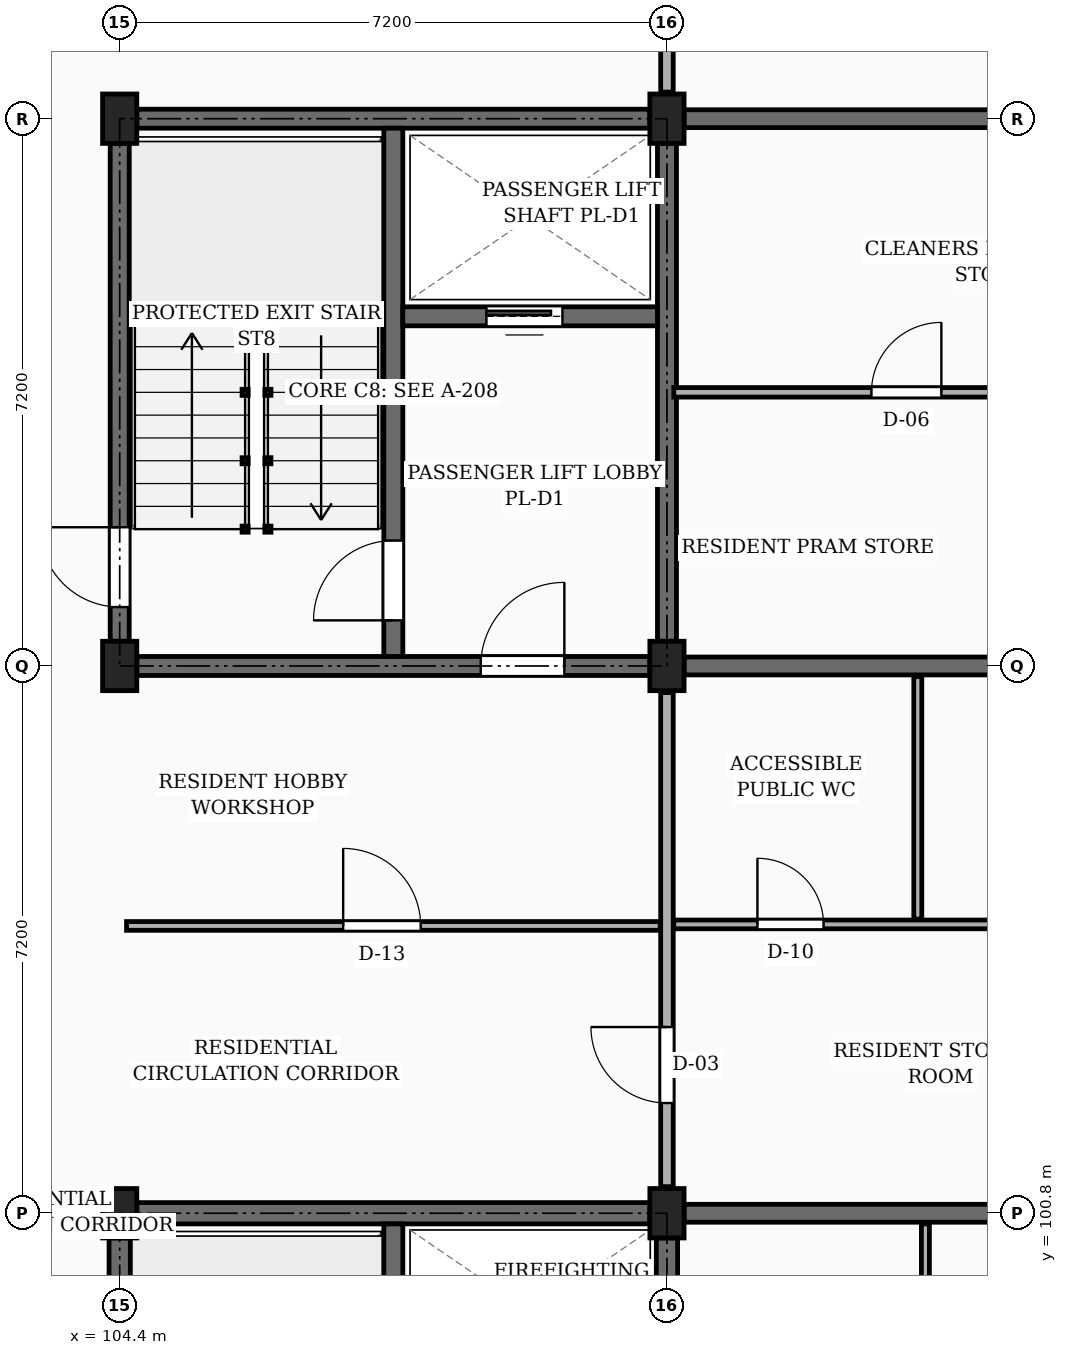
"""IFC4 building model, lengths in metres.
Left out: names, types, materials, properties, quantities, classifications, styles, units other than length and angle.
Written with IfcOpenShell. Run it as: python <this file> out.ifc"""

import sys

from ifc_helpers import new_model, si_unit, direction, frame, frame_2d, origin, origin_2d, place, context, subcontext, project, spatial, rectangle, extrude, element, fill, save


model = new_model("IFC4")
c1 = context("Model", 3, precision=1e-05, world=origin(), true_north=direction((0.0, 1.0)))
c2 = subcontext(c1, "Body", "Model", "MODEL_VIEW")
j1 = project(units=[si_unit("LENGTHUNIT", "METRE"), si_unit("PLANEANGLEUNIT", "RADIAN")], contexts=[c1])
p1 = place(None, origin())
s1 = spatial("IfcSite", under=j1, at=p1, CompositionType="ELEMENT")
p2 = place(p1, origin())
s2 = spatial("IfcBuilding", under=s1, at=p2, CompositionType="ELEMENT")
p3 = place(p2, frame((0.0, 0.0, 13.95)))
s3 = spatial("IfcBuildingStorey", under=s2, at=p3, CompositionType="ELEMENT", Elevation=13.95)
for number, where, z_axis, x_axis in (
    (1, (104.4, 100.8, 0.0), (0.0, 0.0, 1.0), (1.0, 0.0, 0.0)),
    (2, (104.4, 108.0, 0.0), (0.0, 0.0, 1.0), (1.0, 0.0, 0.0)),
    (3, (104.4, 115.2, 0.0), (0.0, 0.0, 1.0), (1.0, 0.0, 0.0)),
    (4, (111.6, 100.8, 0.0), (0.0, 0.0, 1.0), (1.0, 0.0, 0.0)),
    (5, (111.6, 108.0, 0.0), (0.0, 0.0, 1.0), (1.0, 0.0, 0.0)),
    (6, (111.6, 115.2, 0.0), (0.0, 0.0, 1.0), (1.0, 0.0, 0.0)),
):
    element("IfcColumn", number, at=place(p3, frame(where, z_axis=z_axis, x_axis=x_axis)), inside=s3, PredefinedType="COLUMN", context=c2, shape_type="SweptSolid", body=[
        extrude(rectangle(XDim=0.45, YDim=0.65, at=origin_2d()), origin(), (0.0, 0.0, 1.0), 3.15),
    ])
p4 = place(p3, frame((111.825, 100.8, 0.0), z_axis=(0.0, 0.0, 1.0), x_axis=(1.0, 0.0, 0.0)))
e7 = element("IfcWall", 7, at=p4, inside=s3, PredefinedType="SOLIDWALL", context=c2, shape_type="SweptSolid", body=[
    extrude(rectangle(XDim=6.7, YDim=0.235, at=frame_2d((3.35, 0.0))), origin(), (0.0, 0.0, 1.0), 2.19),
])
p5 = place(p3, frame((111.825, 108.0, 0.0), z_axis=(0.0, 0.0, 1.0), x_axis=(1.0, 0.0, 0.0)))
e8 = element("IfcWall", 8, at=p5, inside=s3, PredefinedType="SOLIDWALL", context=c2, shape_type="SweptSolid", body=[
    extrude(rectangle(XDim=6.7, YDim=0.235, at=frame_2d((3.35, 0.0))), origin(), (0.0, 0.0, 1.0), 2.19),
])
p6 = place(p5, frame((4.35, 0.0, 0.0)))
e9 = element("IfcOpeningElement", 9, at=p6, cuts=e8, PredefinedType="OPENING", context=c2, shape_type="SweptSolid", body=[
    extrude(rectangle(XDim=0.98, YDim=2.12, at=frame_2d((0.49, 1.06))), frame((0.0, 0.127, 0.0), z_axis=(0.0, -1.0, 0.0), x_axis=(1.0, 0.0, 0.0)), (0.0, 0.0, 1.0), 0.255),
])
p7 = place(p3, frame((111.825, 115.2, 0.0), z_axis=(0.0, 0.0, 1.0), x_axis=(1.0, 0.0, 0.0)))
e10 = element("IfcWall", 10, at=p7, inside=s3, PredefinedType="SOLIDWALL", context=c2, shape_type="SweptSolid", body=[
    extrude(rectangle(XDim=6.7, YDim=0.235, at=frame_2d((3.35, 0.0))), origin(), (0.0, 0.0, 1.0), 2.19),
])
p8 = place(p3, frame((104.4, 93.925, 0.0), z_axis=(0.0, 0.0, 1.0), x_axis=(0.0, 1.0, 0.0)))
e11 = element("IfcWall", 11, at=p8, inside=s3, PredefinedType="SHEAR", context=c2, shape_type="SweptSolid", body=[
    extrude(rectangle(XDim=6.55, YDim=0.28, at=frame_2d((3.275, 0.0))), origin(), (0.0, 0.0, 1.0), 2.89),
])
p9 = place(p8, frame((0.45, 0.0, 0.0)))
e12 = element("IfcOpeningElement", 12, at=p9, cuts=e11, PredefinedType="OPENING", context=c2, shape_type="SweptSolid", body=[
    extrude(rectangle(XDim=1.05, YDim=2.15, at=frame_2d((0.525, 1.075))), frame((0.0, 0.15, 0.0), z_axis=(0.0, -1.0, 0.0), x_axis=(1.0, 0.0, 0.0)), (0.0, 0.0, 1.0), 0.3),
])
p10 = place(p3, frame((104.625, 100.8, 0.0), z_axis=(0.0, 0.0, 1.0), x_axis=(1.0, 0.0, 0.0)))
e13 = element("IfcWall", 13, at=p10, inside=s3, PredefinedType="SHEAR", context=c2, shape_type="SweptSolid", body=[
    extrude(rectangle(XDim=6.75, YDim=0.28, at=frame_2d((3.375, 0.0))), origin(), (0.0, 0.0, 1.0), 2.89),
])
p11 = place(p3, frame((111.6, 93.925, 0.0), z_axis=(0.0, 0.0, 1.0), x_axis=(0.0, 1.0, 0.0)))
e14 = element("IfcWall", 14, at=p11, inside=s3, PredefinedType="SHEAR", context=c2, shape_type="SweptSolid", body=[
    extrude(rectangle(XDim=6.55, YDim=0.28, at=frame_2d((3.275, 0.0))), origin(), (0.0, 0.0, 1.0), 2.89),
])
p12 = place(p3, frame((108.0, 93.74, 0.0), z_axis=(0.0, 0.0, 1.0), x_axis=(0.0, 1.0, 0.0)))
e15 = element("IfcWall", 15, at=p12, inside=s3, PredefinedType="SHEAR", context=c2, shape_type="SweptSolid", body=[
    extrude(rectangle(XDim=6.92, YDim=0.25, at=frame_2d((3.46, 0.0))), origin(), (0.0, 0.0, 1.0), 2.89),
])
p13 = place(p12, frame((0.46, 0.0, 0.0)))
e16 = element("IfcOpeningElement", 16, at=p13, cuts=e15, PredefinedType="OPENING", context=c2, shape_type="SweptSolid", body=[
    extrude(rectangle(XDim=1.05, YDim=2.15, at=frame_2d((0.525, 1.075))), frame((0.0, 0.135, 0.0), z_axis=(0.0, -1.0, 0.0), x_axis=(1.0, 0.0, 0.0)), (0.0, 0.0, 1.0), 0.27),
])
p14 = place(p3, frame((104.4, 108.325, 0.0), z_axis=(0.0, 0.0, 1.0), x_axis=(0.0, 1.0, 0.0)))
e17 = element("IfcWall", 17, at=p14, inside=s3, PredefinedType="SHEAR", context=c2, shape_type="SweptSolid", body=[
    extrude(rectangle(XDim=6.55, YDim=0.25, at=frame_2d((3.275, 0.0))), origin(), (0.0, 0.0, 1.0), 2.89),
])
p15 = place(p14, frame((0.45, 0.0, 0.0)))
e18 = element("IfcOpeningElement", 18, at=p15, cuts=e17, PredefinedType="OPENING", context=c2, shape_type="SweptSolid", body=[
    extrude(rectangle(XDim=1.05, YDim=2.15, at=frame_2d((0.525, 1.075))), frame((0.0, 0.135, 0.0), z_axis=(0.0, -1.0, 0.0), x_axis=(1.0, 0.0, 0.0)), (0.0, 0.0, 1.0), 0.27),
])
p16 = place(p3, frame((104.625, 115.2, 0.0), z_axis=(0.0, 0.0, 1.0), x_axis=(1.0, 0.0, 0.0)))
e19 = element("IfcWall", 19, at=p16, inside=s3, PredefinedType="SHEAR", context=c2, shape_type="SweptSolid", body=[
    extrude(rectangle(XDim=6.75, YDim=0.25, at=frame_2d((3.375, 0.0))), origin(), (0.0, 0.0, 1.0), 2.89),
])
p17 = place(p3, frame((111.6, 108.325, 0.0), z_axis=(0.0, 0.0, 1.0), x_axis=(0.0, 1.0, 0.0)))
e20 = element("IfcWall", 20, at=p17, inside=s3, PredefinedType="SHEAR", context=c2, shape_type="SweptSolid", body=[
    extrude(rectangle(XDim=6.55, YDim=0.25, at=frame_2d((3.275, 0.0))), origin(), (0.0, 0.0, 1.0), 2.89),
])
p18 = place(p3, frame((104.625, 108.0, 0.0), z_axis=(0.0, 0.0, 1.0), x_axis=(1.0, 0.0, 0.0)))
e21 = element("IfcWall", 21, at=p18, inside=s3, PredefinedType="SHEAR", context=c2, shape_type="SweptSolid", body=[
    extrude(rectangle(XDim=6.75, YDim=0.25, at=frame_2d((3.375, 0.0))), origin(), (0.0, 0.0, 1.0), 2.89),
])
p19 = place(p18, frame((4.525, 0.0, 0.0)))
e22 = element("IfcOpeningElement", 22, at=p19, cuts=e21, PredefinedType="OPENING", context=c2, shape_type="SweptSolid", body=[
    extrude(rectangle(XDim=1.1, YDim=2.15, at=frame_2d((0.55, 1.075))), frame((0.0, 0.135, 0.0), z_axis=(0.0, -1.0, 0.0), x_axis=(1.0, 0.0, 0.0)), (0.0, 0.0, 1.0), 0.27),
])
p20 = place(p3, frame((108.0, 108.125, 0.0), z_axis=(0.0, 0.0, 1.0), x_axis=(0.0, 1.0, 0.0)))
e23 = element("IfcWall", 23, at=p20, inside=s3, PredefinedType="SHEAR", context=c2, shape_type="SweptSolid", body=[
    extrude(rectangle(XDim=6.95, YDim=0.25, at=frame_2d((3.475, 0.0))), origin(), (0.0, 0.0, 1.0), 2.89),
])
p21 = place(p20, frame((0.475, 0.0, 0.0)))
e24 = element("IfcOpeningElement", 24, at=p21, cuts=e23, PredefinedType="OPENING", context=c2, shape_type="SweptSolid", body=[
    extrude(rectangle(XDim=1.05, YDim=2.15, at=frame_2d((0.525, 1.075))), frame((0.0, 0.135, 0.0), z_axis=(0.0, -1.0, 0.0), x_axis=(1.0, 0.0, 0.0)), (0.0, 0.0, 1.0), 0.27),
])
p22 = place(p3, frame((108.125, 112.6, 0.0), z_axis=(0.0, 0.0, 1.0), x_axis=(1.0, 0.0, 0.0)))
e25 = element("IfcWall", 25, at=p22, inside=s3, PredefinedType="SHEAR", context=c2, shape_type="SweptSolid", body=[
    extrude(rectangle(XDim=3.35, YDim=0.25, at=frame_2d((1.675, 0.0))), origin(), (0.0, 0.0, 1.0), 2.89),
])
p23 = place(p22, frame((1.1, 0.0, 0.0)))
e26 = element("IfcOpeningElement", 26, at=p23, cuts=e25, PredefinedType="OPENING", context=c2, shape_type="SweptSolid", body=[
    extrude(rectangle(XDim=1.0, YDim=2.2, at=frame_2d((0.5, 1.1))), frame((0.0, 0.135, 0.0), z_axis=(0.0, -1.0, 0.0), x_axis=(1.0, 0.0, 0.0)), (0.0, 0.0, 1.0), 0.27),
])
p24 = place(p3, frame((111.6, 101.15, 0.0), z_axis=(0.0, 0.0, 1.0), x_axis=(0.0, 1.0, 0.0)))
e27 = element("IfcWall", 27, at=p24, inside=s3, PredefinedType="PARTITIONING", context=c2, shape_type="SweptSolid", body=[
    extrude(rectangle(XDim=6.5, YDim=0.165, at=frame_2d((3.25, 0.0))), origin(), (0.0, 0.0, 1.0), 2.325),
])
p25 = place(p24, frame((1.1, 0.0, 0.0)))
e28 = element("IfcOpeningElement", 28, at=p25, cuts=e27, PredefinedType="OPENING", context=c2, shape_type="SweptSolid", body=[
    extrude(rectangle(XDim=1.0, YDim=2.15, at=frame_2d((0.5, 1.075))), frame((0.0, 0.093, 0.0), z_axis=(0.0, -1.0, 0.0), x_axis=(1.0, 0.0, 0.0)), (0.0, 0.0, 1.0), 0.185),
])
p26 = place(p3, frame((111.6, 115.55, 0.0), z_axis=(0.0, 0.0, 1.0), x_axis=(0.0, 1.0, 0.0)))
e29 = element("IfcWall", 29, at=p26, inside=s3, PredefinedType="PARTITIONING", context=c2, shape_type="SweptSolid", body=[
    extrude(rectangle(XDim=6.5, YDim=0.165, at=frame_2d((3.25, 0.0))), origin(), (0.0, 0.0, 1.0), 2.325),
])
p27 = place(p26, frame((1.1, 0.0, 0.0)))
e30 = element("IfcOpeningElement", 30, at=p27, cuts=e29, PredefinedType="OPENING", context=c2, shape_type="SweptSolid", body=[
    extrude(rectangle(XDim=0.94, YDim=2.12, at=frame_2d((0.47, 1.06))), frame((0.0, 0.093, 0.0), z_axis=(0.0, -1.0, 0.0), x_axis=(1.0, 0.0, 0.0)), (0.0, 0.0, 1.0), 0.185),
])
p28 = place(p3, frame((115.0, 96.97, 0.0), z_axis=(0.0, 0.0, 1.0), x_axis=(0.0, 1.0, 0.0)))
e31 = element("IfcWall", 31, at=p28, inside=s3, PredefinedType="PARTITIONING", context=c2, shape_type="SweptSolid", body=[
    extrude(rectangle(XDim=3.69, YDim=0.105, at=frame_2d((1.845, 0.0))), origin(), (0.0, 0.0, 1.0), 2.325),
])
p29 = place(p3, frame((104.49, 104.58, 0.0), z_axis=(0.0, 0.0, 1.0), x_axis=(1.0, 0.0, 0.0)))
e32 = element("IfcWall", 32, at=p29, inside=s3, PredefinedType="PARTITIONING", context=c2, shape_type="SweptSolid", body=[
    extrude(rectangle(XDim=7.02, YDim=0.115, at=frame_2d((3.51, 0.0))), origin(), (0.0, 0.0, 1.0), 2.325),
])
p30 = place(p29, frame((2.85, 0.0, 0.0)))
e33 = element("IfcOpeningElement", 33, at=p30, cuts=e32, PredefinedType="OPENING", context=c2, shape_type="SweptSolid", body=[
    extrude(rectangle(XDim=1.02, YDim=2.15, at=frame_2d((0.51, 1.075))), frame((0.0, 0.067, 0.0), z_axis=(0.0, -1.0, 0.0), x_axis=(1.0, 0.0, 0.0)), (0.0, 0.0, 1.0), 0.135),
])
p31 = place(p3, frame((111.69, 104.6, 0.0), z_axis=(0.0, 0.0, 1.0), x_axis=(1.0, 0.0, 0.0)))
e34 = element("IfcWall", 34, at=p31, inside=s3, PredefinedType="PARTITIONING", context=c2, shape_type="SweptSolid", body=[
    extrude(rectangle(XDim=6.935, YDim=0.115, at=frame_2d((3.468, 0.0))), origin(), (0.0, 0.0, 1.0), 2.325),
])
p32 = place(p31, frame((1.1, 0.0, 0.0)))
e35 = element("IfcOpeningElement", 35, at=p32, cuts=e34, PredefinedType="OPENING", context=c2, shape_type="SweptSolid", body=[
    extrude(rectangle(XDim=0.87, YDim=2.05, at=frame_2d((0.435, 1.025))), frame((0.0, 0.067, 0.0), z_axis=(0.0, -1.0, 0.0), x_axis=(1.0, 0.0, 0.0)), (0.0, 0.0, 1.0), 0.135),
])
p33 = place(p31, frame((4.5, 0.0, 0.0)))
e36 = element("IfcOpeningElement", 36, at=p33, cuts=e34, PredefinedType="OPENING", context=c2, shape_type="SweptSolid", body=[
    extrude(rectangle(XDim=0.92, YDim=2.1, at=frame_2d((0.46, 1.05))), frame((0.0, 0.067, 0.0), z_axis=(0.0, -1.0, 0.0), x_axis=(1.0, 0.0, 0.0)), (0.0, 0.0, 1.0), 0.135),
])
p34 = place(p3, frame((114.9, 104.67, 0.0), z_axis=(0.0, 0.0, 1.0), x_axis=(0.0, 1.0, 0.0)))
e37 = element("IfcWall", 37, at=p34, inside=s3, PredefinedType="PARTITIONING", context=c2, shape_type="SweptSolid", body=[
    extrude(rectangle(XDim=3.19, YDim=0.105, at=frame_2d((1.595, 0.0))), origin(), (0.0, 0.0, 1.0), 2.325),
])
p35 = place(p3, frame((111.69, 111.6, 0.0), z_axis=(0.0, 0.0, 1.0), x_axis=(1.0, 0.0, 0.0)))
e38 = element("IfcWall", 38, at=p35, inside=s3, PredefinedType="PARTITIONING", context=c2, shape_type="SweptSolid", body=[
    extrude(rectangle(XDim=6.935, YDim=0.125, at=frame_2d((3.468, 0.0))), origin(), (0.0, 0.0, 1.0), 2.325),
])
p36 = place(p35, frame((2.6, 0.0, 0.0)))
e39 = element("IfcOpeningElement", 39, at=p36, cuts=e38, PredefinedType="OPENING", context=c2, shape_type="SweptSolid", body=[
    extrude(rectangle(XDim=0.92, YDim=2.1, at=frame_2d((0.46, 1.05))), frame((0.0, 0.073, 0.0), z_axis=(0.0, -1.0, 0.0), x_axis=(1.0, 0.0, 0.0)), (0.0, 0.0, 1.0), 0.145),
])
p37 = place(p15, origin())
e40 = element("IfcDoor", 40, at=p37, inside=s3, OperationType="SINGLE_SWING_RIGHT", PredefinedType="DOOR", context=c2, shape_type="SweptSolid", body=[
    extrude(rectangle(XDim=1.05, YDim=2.15, at=frame_2d((0.525, 1.075))), frame((0.0, 0.025, 0.0), z_axis=(0.0, -1.0, 0.0), x_axis=(1.0, 0.0, 0.0)), (0.0, 0.0, 1.0), 0.05),
])
fill(e18, e40)
p38 = place(p19, frame((1.1, 0.0, 0.0), z_axis=(0.0, 0.0, 1.0), x_axis=(-1.0, 0.0, 0.0)))
e41 = element("IfcDoor", 41, at=p38, inside=s3, OperationType="SINGLE_SWING_RIGHT", PredefinedType="DOOR", context=c2, shape_type="SweptSolid", body=[
    extrude(rectangle(XDim=1.1, YDim=2.15, at=frame_2d((0.55, 1.075))), frame((0.0, 0.025, 0.0), z_axis=(0.0, -1.0, 0.0), x_axis=(1.0, 0.0, 0.0)), (0.0, 0.0, 1.0), 0.05),
])
fill(e22, e41)
p39 = place(p21, origin())
e42 = element("IfcDoor", 42, at=p39, inside=s3, OperationType="SINGLE_SWING_LEFT", PredefinedType="DOOR", context=c2, shape_type="SweptSolid", body=[
    extrude(rectangle(XDim=1.05, YDim=2.15, at=frame_2d((0.525, 1.075))), frame((0.0, 0.025, 0.0), z_axis=(0.0, -1.0, 0.0), x_axis=(1.0, 0.0, 0.0)), (0.0, 0.0, 1.0), 0.05),
])
fill(e24, e42)
p40 = place(p23, origin())
e43 = element("IfcDoor", 43, at=p40, inside=s3, OperationType="SLIDING_TO_LEFT", PredefinedType="DOOR", context=c2, shape_type="SweptSolid", body=[
    extrude(rectangle(XDim=1.0, YDim=2.2, at=frame_2d((0.5, 1.1))), frame((0.0, 0.025, 0.0), z_axis=(0.0, -1.0, 0.0), x_axis=(1.0, 0.0, 0.0)), (0.0, 0.0, 1.0), 0.05),
])
fill(e26, e43)
p41 = place(p25, origin())
e44 = element("IfcDoor", 44, at=p41, inside=s3, OperationType="SINGLE_SWING_RIGHT", PredefinedType="DOOR", context=c2, shape_type="SweptSolid", body=[
    extrude(rectangle(XDim=1.0, YDim=2.15, at=frame_2d((0.5, 1.075))), frame((0.0, 0.025, 0.0), z_axis=(0.0, -1.0, 0.0), x_axis=(1.0, 0.0, 0.0)), (0.0, 0.0, 1.0), 0.05),
])
fill(e28, e44)
p42 = place(p30, origin())
e45 = element("IfcDoor", 45, at=p42, inside=s3, OperationType="SINGLE_SWING_LEFT", PredefinedType="DOOR", context=c2, shape_type="SweptSolid", body=[
    extrude(rectangle(XDim=1.02, YDim=2.15, at=frame_2d((0.51, 1.075))), frame((0.0, 0.025, 0.0), z_axis=(0.0, -1.0, 0.0), x_axis=(1.0, 0.0, 0.0)), (0.0, 0.0, 1.0), 0.05),
])
fill(e33, e45)
p43 = place(p32, origin())
e46 = element("IfcDoor", 46, at=p43, inside=s3, OperationType="SINGLE_SWING_LEFT", PredefinedType="DOOR", context=c2, shape_type="SweptSolid", body=[
    extrude(rectangle(XDim=0.87, YDim=2.05, at=frame_2d((0.435, 1.025))), frame((0.0, 0.025, 0.0), z_axis=(0.0, -1.0, 0.0), x_axis=(1.0, 0.0, 0.0)), (0.0, 0.0, 1.0), 0.05),
])
fill(e35, e46)
p44 = place(p36, origin())
e47 = element("IfcDoor", 47, at=p44, inside=s3, OperationType="SINGLE_SWING_RIGHT", PredefinedType="DOOR", context=c2, shape_type="SweptSolid", body=[
    extrude(rectangle(XDim=0.92, YDim=2.1, at=frame_2d((0.46, 1.05))), frame((0.0, 0.025, 0.0), z_axis=(0.0, -1.0, 0.0), x_axis=(1.0, 0.0, 0.0)), (0.0, 0.0, 1.0), 0.05),
])
fill(e39, e47)
save(model, sys.argv[1])
